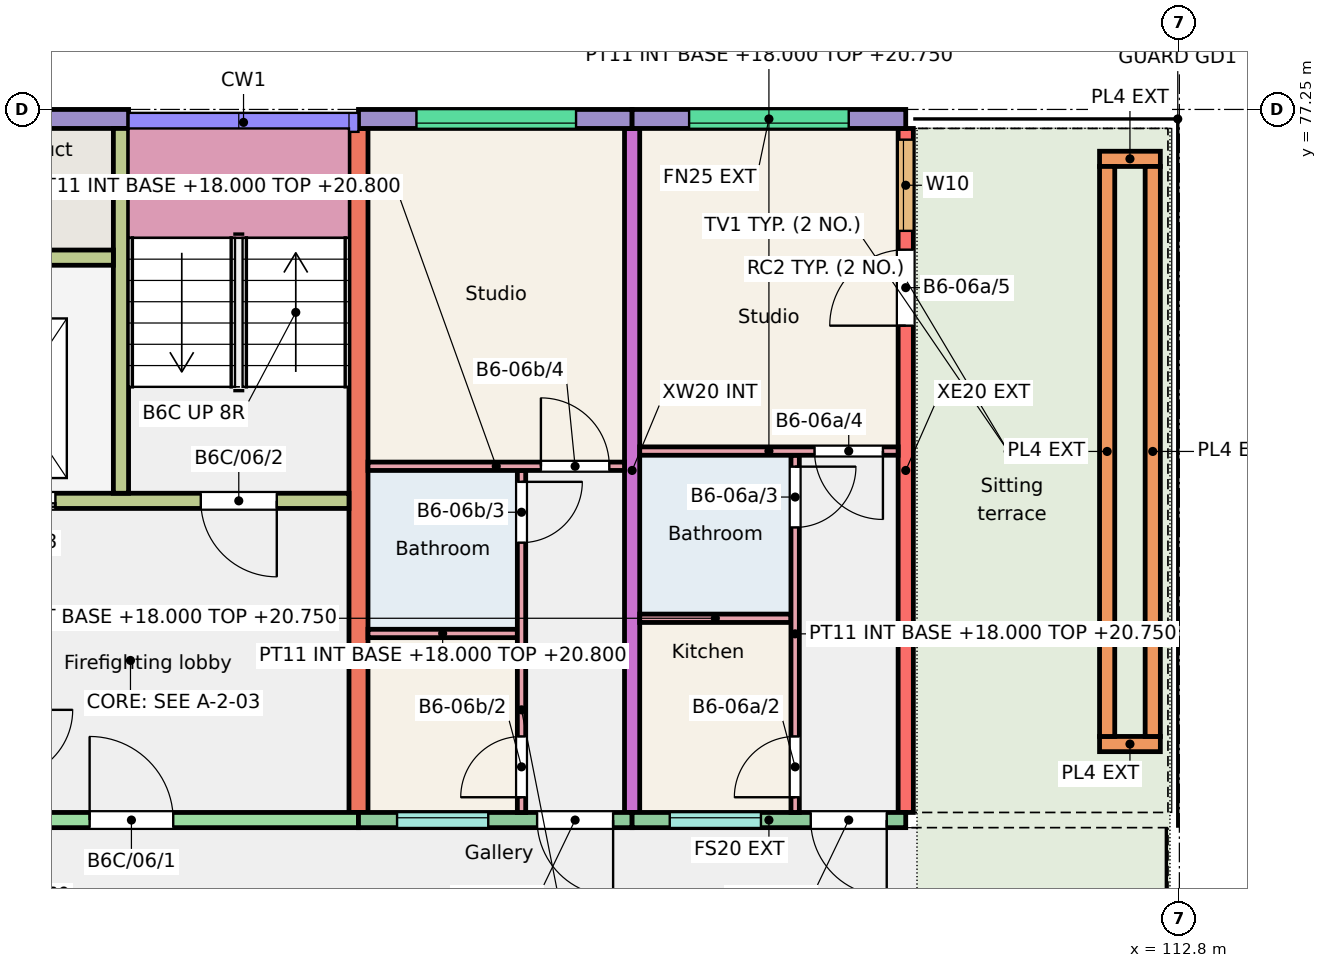
"""IFC4 building model, lengths in metres.
Left out: names, types, materials, properties, quantities, classifications, styles, units other than length and angle.
Written with IfcOpenShell. Run it as: python <this file> out.ifc"""

import sys

from ifc_helpers import new_model, si_unit, direction, frame, frame_2d, origin, place, context, subcontext, project, spatial, rectangle, extrude, element, fill, save


model = new_model("IFC4")
c1 = context("Model", 3, precision=1e-05, world=origin(), true_north=direction((0.0, 1.0)))
c2 = subcontext(c1, "Body", "Model", "MODEL_VIEW")
j1 = project(units=[si_unit("LENGTHUNIT", "METRE"), si_unit("PLANEANGLEUNIT", "RADIAN")], contexts=[c1])
p1 = place(None, origin())
s1 = spatial("IfcSite", under=j1, at=p1, CompositionType="ELEMENT")
p2 = place(p1, origin())
s2 = spatial("IfcBuilding", under=s1, at=p2, CompositionType="ELEMENT")
p3 = place(p2, frame((0.0, 0.0, 18.0)))
s3 = spatial("IfcBuildingStorey", under=s2, at=p3, CompositionType="ELEMENT", Elevation=18.0)
p4 = place(p3, frame((102.0, 68.0, 0.0), z_axis=(0.0, 0.0, 1.0), x_axis=(0.0, 1.0, 0.0)))
e1 = element("IfcWall", 1, at=p4, inside=s3, PredefinedType="SHEAR", context=c2, shape_type="SweptSolid", body=[
    extrude(rectangle(XDim=9.0, YDim=0.25, at=frame_2d((4.5, 0.0))), origin(), (0.0, 0.0, 1.0), 3.0),
])
p5 = place(p3, frame((105.6, 68.0, 0.0), z_axis=(0.0, 0.0, 1.0), x_axis=(0.0, 1.0, 0.0)))
e2 = element("IfcWall", 2, at=p5, inside=s3, PredefinedType="SHEAR", context=c2, shape_type="SweptSolid", body=[
    extrude(rectangle(XDim=9.0, YDim=0.2, at=frame_2d((4.5, 0.0))), origin(), (0.0, 0.0, 1.0), 3.0),
])
p6 = place(p3, frame((109.2, 68.0, 0.0), z_axis=(0.0, 0.0, 1.0), x_axis=(0.0, 1.0, 0.0)))
e3 = element("IfcWall", 3, at=p6, inside=s3, PredefinedType="SHEAR", context=c2, shape_type="SweptSolid", body=[
    extrude(rectangle(XDim=9.0, YDim=0.2, at=frame_2d((4.5, 0.0))), origin(), (0.0, 0.0, 1.0), 3.0),
])
p7 = place(p6, frame((7.653, 0.0, 0.9)))
e4 = element("IfcOpeningElement", 4, at=p7, cuts=e3, PredefinedType="OPENING", context=c2, shape_type="SweptSolid", body=[
    extrude(rectangle(XDim=1.2, YDim=1.5, at=frame_2d((0.6, 0.75))), frame((0.0, 0.11, 0.0), z_axis=(0.0, -1.0, 0.0), x_axis=(1.0, 0.0, 0.0)), (0.0, 0.0, 1.0), 0.22),
])
p8 = place(p6, frame((6.405, 0.0, 0.0)))
e5 = element("IfcOpeningElement", 5, at=p8, cuts=e3, PredefinedType="OPENING", context=c2, shape_type="SweptSolid", body=[
    extrude(rectangle(XDim=1.0, YDim=2.1, at=frame_2d((0.5, 1.05))), frame((0.0, 0.11, 0.0), z_axis=(0.0, -1.0, 0.0), x_axis=(1.0, 0.0, 0.0)), (0.0, 0.0, 1.0), 0.22),
])
p9 = place(p3, frame((96.0, 77.125, 0.0), z_axis=(0.0, 0.0, 1.0), x_axis=(1.0, 0.0, 0.0)))
e6 = element("IfcWall", 6, at=p9, inside=s3, PredefinedType="SOLIDWALL", context=c2, shape_type="SweptSolid", body=[
    extrude(rectangle(XDim=2.975, YDim=0.25, at=frame_2d((1.488, 0.0))), origin(), (0.0, 0.0, 1.0), 3.0),
])
p10 = place(p3, frame((96.15, 67.9, 0.0), z_axis=(0.0, 0.0, 1.0), x_axis=(1.0, 0.0, 0.0)))
e7 = element("IfcWall", 7, at=p10, inside=s3, PredefinedType="SHEAR", context=c2, shape_type="SweptSolid", body=[
    extrude(rectangle(XDim=5.85, YDim=0.2, at=frame_2d((2.925, 0.0))), origin(), (0.0, 0.0, 1.0), 3.0),
])
p11 = place(p10, frame((2.312, 0.0, 0.0)))
e8 = element("IfcOpeningElement", 8, at=p11, cuts=e7, PredefinedType="OPENING", context=c2, shape_type="SweptSolid", body=[
    extrude(rectangle(XDim=1.1, YDim=2.1, at=frame_2d((0.55, 1.05))), frame((0.0, 0.11, 0.0), z_axis=(0.0, -1.0, 0.0), x_axis=(1.0, 0.0, 0.0)), (0.0, 0.0, 1.0), 0.22),
])
p12 = place(p3, frame((96.15, 72.1, 0.0), z_axis=(0.0, 0.0, 1.0), x_axis=(1.0, 0.0, 0.0)))
e9 = element("IfcWall", 9, at=p12, inside=s3, PredefinedType="SHEAR", context=c2, shape_type="SweptSolid", body=[
    extrude(rectangle(XDim=5.725, YDim=0.2, at=frame_2d((2.863, 0.0))), origin(), (0.0, 0.0, 1.0), 3.0),
])
p13 = place(p12, frame((3.775, 0.0, 0.0)))
e10 = element("IfcOpeningElement", 10, at=p13, cuts=e9, PredefinedType="OPENING", context=c2, shape_type="SweptSolid", body=[
    extrude(rectangle(XDim=1.0, YDim=2.1, at=frame_2d((0.5, 1.05))), frame((0.0, 0.11, 0.0), z_axis=(0.0, -1.0, 0.0), x_axis=(1.0, 0.0, 0.0)), (0.0, 0.0, 1.0), 0.22),
])
p14 = place(p12, frame((0.762, 0.0, 0.0)))
e11 = element("IfcOpeningElement", 11, at=p14, cuts=e9, PredefinedType="OPENING", context=c2, shape_type="SweptSolid", body=[
    extrude(rectangle(XDim=1.1, YDim=2.1, at=frame_2d((0.55, 1.05))), frame((0.0, 0.11, 0.0), z_axis=(0.0, -1.0, 0.0), x_axis=(1.0, 0.0, 0.0)), (0.0, 0.0, 1.0), 0.22),
])
p15 = place(p3, frame((98.875, 72.2, 0.0), z_axis=(0.0, 0.0, 1.0), x_axis=(0.0, 1.0, 0.0)))
e12 = element("IfcWall", 12, at=p15, inside=s3, PredefinedType="SHEAR", context=c2, shape_type="SweptSolid", body=[
    extrude(rectangle(XDim=4.8, YDim=0.2, at=frame_2d((2.4, 0.0))), origin(), (0.0, 0.0, 1.0), 3.0),
])
p16 = place(p3, frame((96.15, 75.3, 0.0), z_axis=(0.0, 0.0, 1.0), x_axis=(1.0, 0.0, 0.0)))
e13 = element("IfcWall", 13, at=p16, inside=s3, PredefinedType="SHEAR", context=c2, shape_type="SweptSolid", body=[
    extrude(rectangle(XDim=2.625, YDim=0.2, at=frame_2d((1.312, 0.0))), origin(), (0.0, 0.0, 1.0), 3.0),
])
p17 = place(p3, frame((102.0, 77.125, 0.0), z_axis=(0.0, 0.0, 1.0), x_axis=(1.0, 0.0, 0.0)))
e14 = element("IfcWall", 14, at=p17, inside=s3, PredefinedType="SOLIDWALL", context=c2, shape_type="SweptSolid", body=[
    extrude(rectangle(XDim=3.6, YDim=0.25, at=frame_2d((1.8, 0.0))), origin(), (0.0, 0.0, 1.0), 3.0),
])
p18 = place(p17, frame((0.762, 0.0, 1.2)))
e15 = element("IfcOpeningElement", 15, at=p18, cuts=e14, PredefinedType="OPENING", context=c2, shape_type="SweptSolid", body=[
    extrude(rectangle(XDim=2.1, YDim=1.2, at=frame_2d((1.05, 0.6))), frame((0.0, 0.135, 0.0), z_axis=(0.0, -1.0, 0.0), x_axis=(1.0, 0.0, 0.0)), (0.0, 0.0, 1.0), 0.27),
])
p19 = place(p3, frame((102.0, 67.9, 0.0), z_axis=(0.0, 0.0, 1.0), x_axis=(1.0, 0.0, 0.0)))
e16 = element("IfcWall", 16, at=p19, inside=s3, PredefinedType="SOLIDWALL", context=c2, shape_type="SweptSolid", body=[
    extrude(rectangle(XDim=3.6, YDim=0.2, at=frame_2d((1.8, 0.0))), origin(), (0.0, 0.0, 1.0), 3.0),
])
p20 = place(p19, frame((0.508, 0.0, 1.1)))
e17 = element("IfcOpeningElement", 17, at=p20, cuts=e16, PredefinedType="OPENING", context=c2, shape_type="SweptSolid", body=[
    extrude(rectangle(XDim=1.2, YDim=1.3, at=frame_2d((0.6, 0.65))), frame((0.0, 0.11, 0.0), z_axis=(0.0, -1.0, 0.0), x_axis=(1.0, 0.0, 0.0)), (0.0, 0.0, 1.0), 0.22),
])
p21 = place(p19, frame((2.35, 0.0, 0.0)))
e18 = element("IfcOpeningElement", 18, at=p21, cuts=e16, PredefinedType="OPENING", context=c2, shape_type="SweptSolid", body=[
    extrude(rectangle(XDim=1.0, YDim=2.1, at=frame_2d((0.5, 1.05))), frame((0.0, 0.11, 0.0), z_axis=(0.0, -1.0, 0.0), x_axis=(1.0, 0.0, 0.0)), (0.0, 0.0, 1.0), 0.22),
])
p22 = place(p3, frame((105.6, 77.125, 0.0), z_axis=(0.0, 0.0, 1.0), x_axis=(1.0, 0.0, 0.0)))
e19 = element("IfcWall", 19, at=p22, inside=s3, PredefinedType="SOLIDWALL", context=c2, shape_type="SweptSolid", body=[
    extrude(rectangle(XDim=3.6, YDim=0.25, at=frame_2d((1.8, 0.0))), origin(), (0.0, 0.0, 1.0), 3.0),
])
p23 = place(p22, frame((0.75, 0.0, 1.2)))
e20 = element("IfcOpeningElement", 20, at=p23, cuts=e19, PredefinedType="OPENING", context=c2, shape_type="SweptSolid", body=[
    extrude(rectangle(XDim=2.1, YDim=1.2, at=frame_2d((1.05, 0.6))), frame((0.0, 0.135, 0.0), z_axis=(0.0, -1.0, 0.0), x_axis=(1.0, 0.0, 0.0)), (0.0, 0.0, 1.0), 0.27),
])
p24 = place(p3, frame((105.6, 67.9, 0.0), z_axis=(0.0, 0.0, 1.0), x_axis=(1.0, 0.0, 0.0)))
e21 = element("IfcWall", 21, at=p24, inside=s3, PredefinedType="SOLIDWALL", context=c2, shape_type="SweptSolid", body=[
    extrude(rectangle(XDim=3.6, YDim=0.2, at=frame_2d((1.8, 0.0))), origin(), (0.0, 0.0, 1.0), 3.0),
])
p25 = place(p24, frame((0.495, 0.0, 1.1)))
e22 = element("IfcOpeningElement", 22, at=p25, cuts=e21, PredefinedType="OPENING", context=c2, shape_type="SweptSolid", body=[
    extrude(rectangle(XDim=1.2, YDim=1.3, at=frame_2d((0.6, 0.65))), frame((0.0, 0.11, 0.0), z_axis=(0.0, -1.0, 0.0), x_axis=(1.0, 0.0, 0.0)), (0.0, 0.0, 1.0), 0.22),
])
p26 = place(p24, frame((2.35, 0.0, 0.0)))
e23 = element("IfcOpeningElement", 23, at=p26, cuts=e21, PredefinedType="OPENING", context=c2, shape_type="SweptSolid", body=[
    extrude(rectangle(XDim=1.0, YDim=2.1, at=frame_2d((0.5, 1.05))), frame((0.0, 0.11, 0.0), z_axis=(0.0, -1.0, 0.0), x_axis=(1.0, 0.0, 0.0)), (0.0, 0.0, 1.0), 0.22),
])
for number, where, z_axis, x_axis in (
    (24, (111.75, 68.9, 0.01), (0.0, 0.0, 1.0), (1.0, 0.0, 0.0)),
    (25, (111.75, 76.6, 0.01), (0.0, 0.0, 1.0), (1.0, 0.0, 0.0)),
):
    element("IfcWall", number, at=place(p3, frame(where, z_axis=z_axis, x_axis=x_axis)), inside=s3, PredefinedType="SOLIDWALL", context=c2, shape_type="SweptSolid", body=[
        extrude(rectangle(XDim=0.8, YDim=0.2, at=frame_2d((0.4, 0.0))), origin(), (0.0, 0.0, 1.0), 0.45),
    ])
for number, where, z_axis, x_axis in (
    (26, (111.85, 69.0, 0.01), (0.0, 0.0, 1.0), (0.0, 1.0, 0.0)),
    (27, (112.45, 69.0, 0.01), (0.0, 0.0, 1.0), (0.0, 1.0, 0.0)),
):
    element("IfcWall", number, at=place(p3, frame(where, z_axis=z_axis, x_axis=x_axis)), inside=s3, PredefinedType="SOLIDWALL", context=c2, shape_type="SweptSolid", body=[
        extrude(rectangle(XDim=7.5, YDim=0.2, at=frame_2d((3.75, 0.0))), origin(), (0.0, 0.0, 1.0), 0.45),
    ])
p27 = place(p3, frame((105.7, 70.555, 0.0), z_axis=(0.0, 0.0, 1.0), x_axis=(1.0, 0.0, 0.0)))
e28 = element("IfcWall", 28, at=p27, inside=s3, PredefinedType="PARTITIONING", context=c2, shape_type="SweptSolid", body=[
    extrude(rectangle(XDim=1.99, YDim=0.11, at=frame_2d((0.995, 0.0))), origin(), (0.0, 0.0, 1.0), 2.75),
])
p28 = place(p3, frame((107.745, 68.0, 0.0), z_axis=(0.0, 0.0, 1.0), x_axis=(0.0, 1.0, 0.0)))
e29 = element("IfcWall", 29, at=p28, inside=s3, PredefinedType="PARTITIONING", context=c2, shape_type="SweptSolid", body=[
    extrude(rectangle(XDim=4.7, YDim=0.11, at=frame_2d((2.35, 0.0))), origin(), (0.0, 0.0, 1.0), 2.75),
])
p29 = place(p28, frame((0.2, 0.0, 0.0)))
e30 = element("IfcOpeningElement", 30, at=p29, cuts=e29, PredefinedType="OPENING", context=c2, shape_type="SweptSolid", body=[
    extrude(rectangle(XDim=0.8, YDim=2.1, at=frame_2d((0.4, 1.05))), frame((0.0, 0.065, 0.0), z_axis=(0.0, -1.0, 0.0), x_axis=(1.0, 0.0, 0.0)), (0.0, 0.0, 1.0), 0.13),
])
p30 = place(p28, frame((3.75, 0.0, 0.0)))
e31 = element("IfcOpeningElement", 31, at=p30, cuts=e29, PredefinedType="OPENING", context=c2, shape_type="SweptSolid", body=[
    extrude(rectangle(XDim=0.8, YDim=2.1, at=frame_2d((0.4, 1.05))), frame((0.0, 0.065, 0.0), z_axis=(0.0, -1.0, 0.0), x_axis=(1.0, 0.0, 0.0)), (0.0, 0.0, 1.0), 0.13),
])
p31 = place(p3, frame((105.7, 72.755, 0.0), z_axis=(0.0, 0.0, 1.0), x_axis=(1.0, 0.0, 0.0)))
e32 = element("IfcWall", 32, at=p31, inside=s3, PredefinedType="PARTITIONING", context=c2, shape_type="SweptSolid", body=[
    extrude(rectangle(XDim=3.4, YDim=0.11, at=frame_2d((1.7, 0.0))), origin(), (0.0, 0.0, 1.0), 2.75),
])
p32 = place(p31, frame((2.3, 0.0, 0.0)))
e33 = element("IfcOpeningElement", 33, at=p32, cuts=e32, PredefinedType="OPENING", context=c2, shape_type="SweptSolid", body=[
    extrude(rectangle(XDim=0.9, YDim=2.1, at=frame_2d((0.45, 1.05))), frame((0.0, 0.065, 0.0), z_axis=(0.0, -1.0, 0.0), x_axis=(1.0, 0.0, 0.0)), (0.0, 0.0, 1.0), 0.13),
])
p33 = place(p3, frame((102.125, 70.355, 0.0), z_axis=(0.0, 0.0, 1.0), x_axis=(1.0, 0.0, 0.0)))
e34 = element("IfcWall", 34, at=p33, inside=s3, PredefinedType="PARTITIONING", context=c2, shape_type="SweptSolid", body=[
    extrude(rectangle(XDim=1.965, YDim=0.11, at=frame_2d((0.982, 0.0))), origin(), (0.0, 0.0, 1.0), 2.8),
])
p34 = place(p3, frame((104.145, 68.0, 0.0), z_axis=(0.0, 0.0, 1.0), x_axis=(0.0, 1.0, 0.0)))
e35 = element("IfcWall", 35, at=p34, inside=s3, PredefinedType="PARTITIONING", context=c2, shape_type="SweptSolid", body=[
    extrude(rectangle(XDim=4.5, YDim=0.11, at=frame_2d((2.25, 0.0))), origin(), (0.0, 0.0, 1.0), 2.8),
])
p35 = place(p34, frame((0.2, 0.0, 0.0)))
e36 = element("IfcOpeningElement", 36, at=p35, cuts=e35, PredefinedType="OPENING", context=c2, shape_type="SweptSolid", body=[
    extrude(rectangle(XDim=0.8, YDim=2.1, at=frame_2d((0.4, 1.05))), frame((0.0, 0.065, 0.0), z_axis=(0.0, -1.0, 0.0), x_axis=(1.0, 0.0, 0.0)), (0.0, 0.0, 1.0), 0.13),
])
p36 = place(p34, frame((3.55, 0.0, 0.0)))
e37 = element("IfcOpeningElement", 37, at=p36, cuts=e35, PredefinedType="OPENING", context=c2, shape_type="SweptSolid", body=[
    extrude(rectangle(XDim=0.8, YDim=2.1, at=frame_2d((0.4, 1.05))), frame((0.0, 0.065, 0.0), z_axis=(0.0, -1.0, 0.0), x_axis=(1.0, 0.0, 0.0)), (0.0, 0.0, 1.0), 0.13),
])
p37 = place(p3, frame((102.125, 72.555, 0.0), z_axis=(0.0, 0.0, 1.0), x_axis=(1.0, 0.0, 0.0)))
e38 = element("IfcWall", 38, at=p37, inside=s3, PredefinedType="PARTITIONING", context=c2, shape_type="SweptSolid", body=[
    extrude(rectangle(XDim=3.375, YDim=0.11, at=frame_2d((1.688, 0.0))), origin(), (0.0, 0.0, 1.0), 2.8),
])
p38 = place(p37, frame((2.275, 0.0, 0.0)))
e39 = element("IfcOpeningElement", 39, at=p38, cuts=e38, PredefinedType="OPENING", context=c2, shape_type="SweptSolid", body=[
    extrude(rectangle(XDim=0.9, YDim=2.1, at=frame_2d((0.45, 1.05))), frame((0.0, 0.065, 0.0), z_axis=(0.0, -1.0, 0.0), x_axis=(1.0, 0.0, 0.0)), (0.0, 0.0, 1.0), 0.13),
])
p39 = place(p25, origin())
e40 = element("IfcWindow", 40, at=p39, inside=s3, PartitioningType="SINGLE_PANEL", PredefinedType="WINDOW", context=c2, shape_type="SweptSolid", body=[
    extrude(rectangle(XDim=1.2, YDim=1.3, at=frame_2d((0.6, 0.65))), frame((0.0, 0.06, 0.0), z_axis=(0.0, -1.0, 0.0), x_axis=(1.0, 0.0, 0.0)), (0.0, 0.0, 1.0), 0.06),
])
fill(e22, e40)
p40 = place(p23, origin())
e41 = element("IfcWindow", 41, at=p40, inside=s3, PartitioningType="SINGLE_PANEL", PredefinedType="WINDOW", context=c2, shape_type="SweptSolid", body=[
    extrude(rectangle(XDim=2.1, YDim=1.2, at=frame_2d((1.05, 0.6))), frame((0.0, -0.025, 0.0), z_axis=(0.0, -1.0, 0.0), x_axis=(1.0, 0.0, 0.0)), (0.0, 0.0, 1.0), 0.06),
])
fill(e20, e41)
p41 = place(p7, origin())
e42 = element("IfcWindow", 42, at=p41, inside=s3, PartitioningType="SINGLE_PANEL", PredefinedType="WINDOW", context=c2, shape_type="SweptSolid", body=[
    extrude(rectangle(XDim=1.2, YDim=1.5, at=frame_2d((0.6, 0.75))), frame((0.0, 0.06, 0.0), z_axis=(0.0, -1.0, 0.0), x_axis=(1.0, 0.0, 0.0)), (0.0, 0.0, 1.0), 0.06),
])
fill(e4, e42)
p42 = place(p20, origin())
e43 = element("IfcWindow", 43, at=p42, inside=s3, PartitioningType="SINGLE_PANEL", PredefinedType="WINDOW", context=c2, shape_type="SweptSolid", body=[
    extrude(rectangle(XDim=1.2, YDim=1.3, at=frame_2d((0.6, 0.65))), frame((0.0, 0.06, 0.0), z_axis=(0.0, -1.0, 0.0), x_axis=(1.0, 0.0, 0.0)), (0.0, 0.0, 1.0), 0.06),
])
fill(e17, e43)
p43 = place(p18, origin())
e44 = element("IfcWindow", 44, at=p43, inside=s3, PartitioningType="SINGLE_PANEL", PredefinedType="WINDOW", context=c2, shape_type="SweptSolid", body=[
    extrude(rectangle(XDim=2.1, YDim=1.2, at=frame_2d((1.05, 0.6))), frame((0.0, -0.025, 0.0), z_axis=(0.0, -1.0, 0.0), x_axis=(1.0, 0.0, 0.0)), (0.0, 0.0, 1.0), 0.06),
])
fill(e15, e44)
p44 = place(p26, origin())
e45 = element("IfcDoor", 45, at=p44, inside=s3, OperationType="SINGLE_SWING_RIGHT", PredefinedType="DOOR", context=c2, shape_type="SweptSolid", body=[
    extrude(rectangle(XDim=1.0, YDim=2.1, at=frame_2d((0.5, 1.05))), frame((0.0, 0.025, 0.0), z_axis=(0.0, -1.0, 0.0), x_axis=(1.0, 0.0, 0.0)), (0.0, 0.0, 1.0), 0.05),
])
fill(e23, e45)
p45 = place(p29, origin())
e46 = element("IfcDoor", 46, at=p45, inside=s3, OperationType="SINGLE_SWING_LEFT", PredefinedType="DOOR", context=c2, shape_type="SweptSolid", body=[
    extrude(rectangle(XDim=0.8, YDim=2.1, at=frame_2d((0.4, 1.05))), frame((0.0, 0.025, 0.0), z_axis=(0.0, -1.0, 0.0), x_axis=(1.0, 0.0, 0.0)), (0.0, 0.0, 1.0), 0.05),
])
fill(e30, e46)
p46 = place(p30, origin())
e47 = element("IfcDoor", 47, at=p46, inside=s3, OperationType="SINGLE_SWING_RIGHT", PredefinedType="DOOR", context=c2, shape_type="SweptSolid", body=[
    extrude(rectangle(XDim=0.8, YDim=2.1, at=frame_2d((0.4, 1.05))), frame((0.0, 0.025, 0.0), z_axis=(0.0, -1.0, 0.0), x_axis=(1.0, 0.0, 0.0)), (0.0, 0.0, 1.0), 0.05),
])
fill(e31, e47)
p47 = place(p32, origin())
e48 = element("IfcDoor", 48, at=p47, inside=s3, OperationType="SINGLE_SWING_RIGHT", PredefinedType="DOOR", context=c2, shape_type="SweptSolid", body=[
    extrude(rectangle(XDim=0.9, YDim=2.1, at=frame_2d((0.45, 1.05))), frame((0.0, 0.025, 0.0), z_axis=(0.0, -1.0, 0.0), x_axis=(1.0, 0.0, 0.0)), (0.0, 0.0, 1.0), 0.05),
])
fill(e33, e48)
p48 = place(p8, origin())
e49 = element("IfcDoor", 49, at=p48, inside=s3, OperationType="SINGLE_SWING_LEFT", PredefinedType="DOOR", context=c2, shape_type="SweptSolid", body=[
    extrude(rectangle(XDim=1.0, YDim=2.1, at=frame_2d((0.5, 1.05))), frame((0.0, 0.025, 0.0), z_axis=(0.0, -1.0, 0.0), x_axis=(1.0, 0.0, 0.0)), (0.0, 0.0, 1.0), 0.05),
])
fill(e5, e49)
p49 = place(p21, origin())
e50 = element("IfcDoor", 50, at=p49, inside=s3, OperationType="SINGLE_SWING_RIGHT", PredefinedType="DOOR", context=c2, shape_type="SweptSolid", body=[
    extrude(rectangle(XDim=1.0, YDim=2.1, at=frame_2d((0.5, 1.05))), frame((0.0, 0.025, 0.0), z_axis=(0.0, -1.0, 0.0), x_axis=(1.0, 0.0, 0.0)), (0.0, 0.0, 1.0), 0.05),
])
fill(e18, e50)
p50 = place(p35, origin())
e51 = element("IfcDoor", 51, at=p50, inside=s3, OperationType="SINGLE_SWING_LEFT", PredefinedType="DOOR", context=c2, shape_type="SweptSolid", body=[
    extrude(rectangle(XDim=0.8, YDim=2.1, at=frame_2d((0.4, 1.05))), frame((0.0, 0.025, 0.0), z_axis=(0.0, -1.0, 0.0), x_axis=(1.0, 0.0, 0.0)), (0.0, 0.0, 1.0), 0.05),
])
fill(e36, e51)
p51 = place(p36, origin())
e52 = element("IfcDoor", 52, at=p51, inside=s3, OperationType="SINGLE_SWING_RIGHT", PredefinedType="DOOR", context=c2, shape_type="SweptSolid", body=[
    extrude(rectangle(XDim=0.8, YDim=2.1, at=frame_2d((0.4, 1.05))), frame((0.0, 0.025, 0.0), z_axis=(0.0, -1.0, 0.0), x_axis=(1.0, 0.0, 0.0)), (0.0, 0.0, 1.0), 0.05),
])
fill(e37, e52)
p52 = place(p38, origin())
e53 = element("IfcDoor", 53, at=p52, inside=s3, OperationType="SINGLE_SWING_LEFT", PredefinedType="DOOR", context=c2, shape_type="SweptSolid", body=[
    extrude(rectangle(XDim=0.9, YDim=2.1, at=frame_2d((0.45, 1.05))), frame((0.0, 0.025, 0.0), z_axis=(0.0, -1.0, 0.0), x_axis=(1.0, 0.0, 0.0)), (0.0, 0.0, 1.0), 0.05),
])
fill(e39, e53)
p53 = place(p11, origin())
e54 = element("IfcDoor", 54, at=p53, inside=s3, OperationType="SINGLE_SWING_LEFT", PredefinedType="DOOR", context=c2, shape_type="SweptSolid", body=[
    extrude(rectangle(XDim=1.1, YDim=2.1, at=frame_2d((0.55, 1.05))), frame((0.0, 0.025, 0.0), z_axis=(0.0, -1.0, 0.0), x_axis=(1.0, 0.0, 0.0)), (0.0, 0.0, 1.0), 0.05),
])
fill(e8, e54)
p54 = place(p13, origin())
e55 = element("IfcDoor", 55, at=p54, inside=s3, OperationType="SINGLE_SWING_RIGHT", PredefinedType="DOOR", context=c2, shape_type="SweptSolid", body=[
    extrude(rectangle(XDim=1.0, YDim=2.1, at=frame_2d((0.5, 1.05))), frame((0.0, 0.025, 0.0), z_axis=(0.0, -1.0, 0.0), x_axis=(1.0, 0.0, 0.0)), (0.0, 0.0, 1.0), 0.05),
])
fill(e10, e55)
p55 = place(p14, origin())
e56 = element("IfcDoor", 56, at=p55, inside=s3, OperationType="DOUBLE_DOOR_SLIDING", PredefinedType="DOOR", context=c2, shape_type="SweptSolid", body=[
    extrude(rectangle(XDim=1.1, YDim=2.1, at=frame_2d((0.55, 1.05))), frame((0.0, 0.025, 0.0), z_axis=(0.0, -1.0, 0.0), x_axis=(1.0, 0.0, 0.0)), (0.0, 0.0, 1.0), 0.05),
])
fill(e11, e56)
save(model, sys.argv[1])
